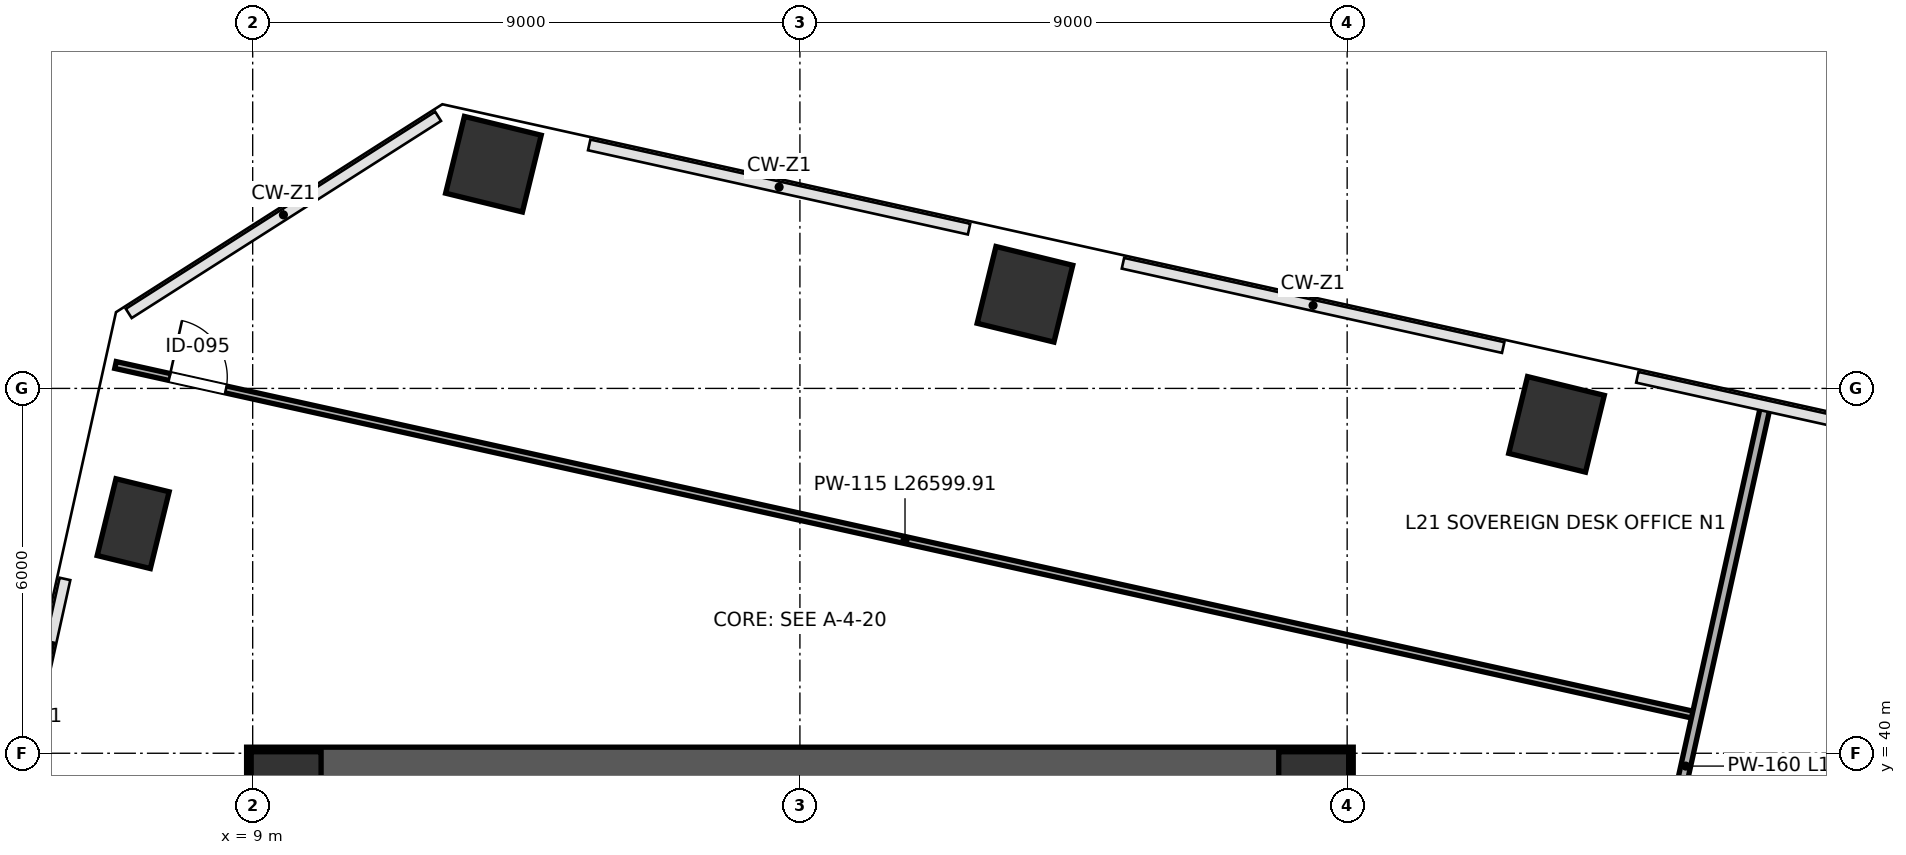
"""IFC4 building model, lengths in metres.
Left out: names, types, materials, properties, quantities, classifications, styles, units other than length and angle.
Written with IfcOpenShell. Run it as: python <this file> out.ifc"""

import sys

from ifc_helpers import new_model, si_unit, direction, frame, frame_2d, origin, origin_2d, place, context, subcontext, project, spatial, rectangle, extrude, clip, halfspace, source, transform, mapped, element, fill, save


model = new_model("IFC4")
c1 = context("Model", 3, precision=1e-05, world=origin(), true_north=direction((0.0, 1.0)))
c2 = subcontext(c1, "Body", "Model", "MODEL_VIEW")
j1 = project(units=[si_unit("LENGTHUNIT", "METRE"), si_unit("PLANEANGLEUNIT", "RADIAN")], contexts=[c1])
p1 = place(None, origin())
s1 = spatial("IfcSite", under=j1, at=p1, CompositionType="ELEMENT")
p2 = place(p1, origin())
s2 = spatial("IfcBuilding", under=s1, at=p2, CompositionType="ELEMENT")
p3 = place(p2, frame((0.0, 0.0, 95.8)))
s3 = spatial("IfcBuildingStorey", under=s2, at=p3, CompositionType="ELEMENT", Elevation=95.8)
m1 = source(origin(), c2, "Body", "SweptSolid", [
    extrude(rectangle(XDim=1.15, YDim=1.15, at=origin_2d()), origin(), (0.0, 0.0, 1.0), 4.198),
])
for number, where, z_axis, x_axis in (
    (1, (9.55, 39.45, 0.001), (0.0, 0.0, 1.0), (1.0, 0.0, 0.0)),
    (2, (26.45, 39.45, 0.001), (0.0, 0.0, 1.0), (1.0, 0.0, 0.0)),
):
    element("IfcColumn", number, at=place(p3, frame(where, z_axis=z_axis, x_axis=x_axis)), inside=s3, PredefinedType="COLUMN", context=c2, shape_type="MappedRepresentation", body=[
        mapped(m1, transform((0.0, 0.0, 0.0), scale=1.0)),
    ])
p4 = place(p3, frame((12.959, 49.687, 0.0), z_axis=(0.091833343277, 0.043083023137, 0.99484194231), x_axis=(0.198481878396, -0.979807961989, 0.024110196407)))
e3 = element("IfcColumn", 3, at=p4, inside=s3, PredefinedType="COLUMN", context=c2, shape_type="Clipping", body=[
    clip(clip(extrude(rectangle(XDim=1.3, YDim=1.3, at=origin_2d()), origin(), (0.0, 0.0, 1.0), 4.222), halfspace(frame((0.0, 0.0, 0.081), z_axis=(0.0, 0.0, -1.0), x_axis=(1.0, 0.0, 0.0)), False)), halfspace(frame((0.0, 0.0, 4.141), z_axis=(0.0, 0.0, 1.0), x_axis=(1.0, 0.0, 0.0)), False)),
])
p5 = place(p3, frame((21.701, 47.548, 0.0), z_axis=(0.080479677017, -0.001912044162, 0.996754415929), x_axis=(-0.259918359422, -0.965441000631, 0.019134281708)))
e4 = element("IfcColumn", 4, at=p5, inside=s3, PredefinedType="COLUMN", context=c2, shape_type="Clipping", body=[
    clip(clip(extrude(rectangle(XDim=1.3, YDim=1.3, at=origin_2d()), origin(), (0.0, 0.0, 1.0), 4.214), halfspace(frame((0.0, 0.0, 0.064), z_axis=(0.0, 0.0, -1.0), x_axis=(1.0, 0.0, 0.0)), False)), halfspace(frame((0.0, 0.0, 4.149), z_axis=(0.0, 0.0, 1.0), x_axis=(1.0, 0.0, 0.0)), False)),
])
p6 = place(p3, frame((30.443, 45.409, 0.0), z_axis=(0.068874852262, -0.047094411177, 0.996513106367), x_axis=(-0.743779680485, -0.66813059545, 0.01983164948)))
e5 = element("IfcColumn", 5, at=p6, inside=s3, PredefinedType="COLUMN", context=c2, shape_type="Clipping", body=[
    clip(clip(extrude(rectangle(XDim=1.3, YDim=1.3, at=origin_2d()), origin(), (0.0, 0.0, 1.0), 4.215), halfspace(frame((0.0, 0.0, 0.067), z_axis=(0.0, 0.0, -1.0), x_axis=(1.0, 0.0, 0.0)), False)), halfspace(frame((0.0, 0.0, 4.148), z_axis=(0.0, 0.0, 1.0), x_axis=(1.0, 0.0, 0.0)), False)),
])
p7 = place(p3, frame((7.034, 43.776, 0.0), z_axis=(0.061677203193, 0.074116789203, 0.995340456409), x_axis=(0.59530735694, -0.803171151996, 0.022918363263)))
e6 = element("IfcColumn", 6, at=p7, inside=s3, PredefinedType="PILASTER", context=c2, shape_type="Clipping", body=[
    clip(clip(extrude(rectangle(XDim=0.9, YDim=1.3, at=origin_2d()), origin(), (0.0, 0.0, 1.0), 4.22), halfspace(frame((0.0, 0.0, 0.072), z_axis=(0.0, 0.0, -1.0), x_axis=(1.0, 0.0, 0.0)), False)), halfspace(frame((0.0, 0.0, 4.147), z_axis=(0.0, 0.0, 1.0), x_axis=(1.0, 0.0, 0.0)), False)),
])
p8 = place(p3, frame((8.9, 39.825, 0.0), z_axis=(0.0, 0.0, 1.0), x_axis=(1.0, 0.0, 0.0)))
e7 = element("IfcWall", 7, at=p8, inside=s3, PredefinedType="SHEAR", context=c2, shape_type="SweptSolid", body=[
    extrude(rectangle(XDim=18.2, YDim=0.55, at=frame_2d((9.1, 0.0))), origin(), (0.0, 0.0, 1.0), 3.96),
])
p9 = place(p3, frame((6.744, 46.385, 0.0), z_axis=(0.0, 0.0, 1.0), x_axis=(0.976297719541, -0.216431889561, 0.0)))
e8 = element("IfcWall", 8, at=p9, inside=s3, PredefinedType="PARTITIONING", context=c2, shape_type="SweptSolid", body=[
    extrude(rectangle(XDim=26.6, YDim=0.115, at=frame_2d((13.3, 0.0))), origin(), (0.0, 0.0, 1.0), 3.96),
])
p10 = place(p9, frame((0.91, 0.0, 0.0)))
e9 = element("IfcOpeningElement", 9, at=p10, cuts=e8, PredefinedType="OPENING", context=c2, shape_type="SweptSolid", body=[
    extrude(rectangle(XDim=0.95, YDim=2.15, at=frame_2d((0.475, 1.075))), frame((0.0, 0.067, 0.0), z_axis=(0.0, -1.0, 0.0), x_axis=(1.0, 0.0, 0.0)), (0.0, 0.0, 1.0), 0.135),
])
p11 = place(p3, frame((31.265, 33.912, 0.0), z_axis=(0.0, 0.0, 1.0), x_axis=(0.216425867349, 0.976299054564, 0.0)))
e10 = element("IfcWall", 10, at=p11, inside=s3, PredefinedType="PARTITIONING", context=c2, shape_type="SweptSolid", body=[
    extrude(rectangle(XDim=12.04, YDim=0.16, at=frame_2d((6.02, 0.0))), origin(), (0.0, 0.0, 1.0), 3.095),
])
m2 = source(origin(), c2, "Body", "SweptSolid", [
    extrude(rectangle(XDim=0.95, YDim=2.15, at=frame_2d((0.475, 1.075))), frame((0.0, 0.025, 0.0), z_axis=(0.0, -1.0, 0.0), x_axis=(1.0, 0.0, 0.0)), (0.0, 0.0, 1.0), 0.05),
])
p12 = place(p10, origin())
e11 = element("IfcDoor", 11, at=p12, inside=s3, OperationType="SINGLE_SWING_LEFT", PredefinedType="DOOR", context=c2, shape_type="MappedRepresentation", body=[
    mapped(m2, transform((0.0, 0.0, 0.0), scale=1.0)),
])
fill(e9, e11)
save(model, sys.argv[1])
